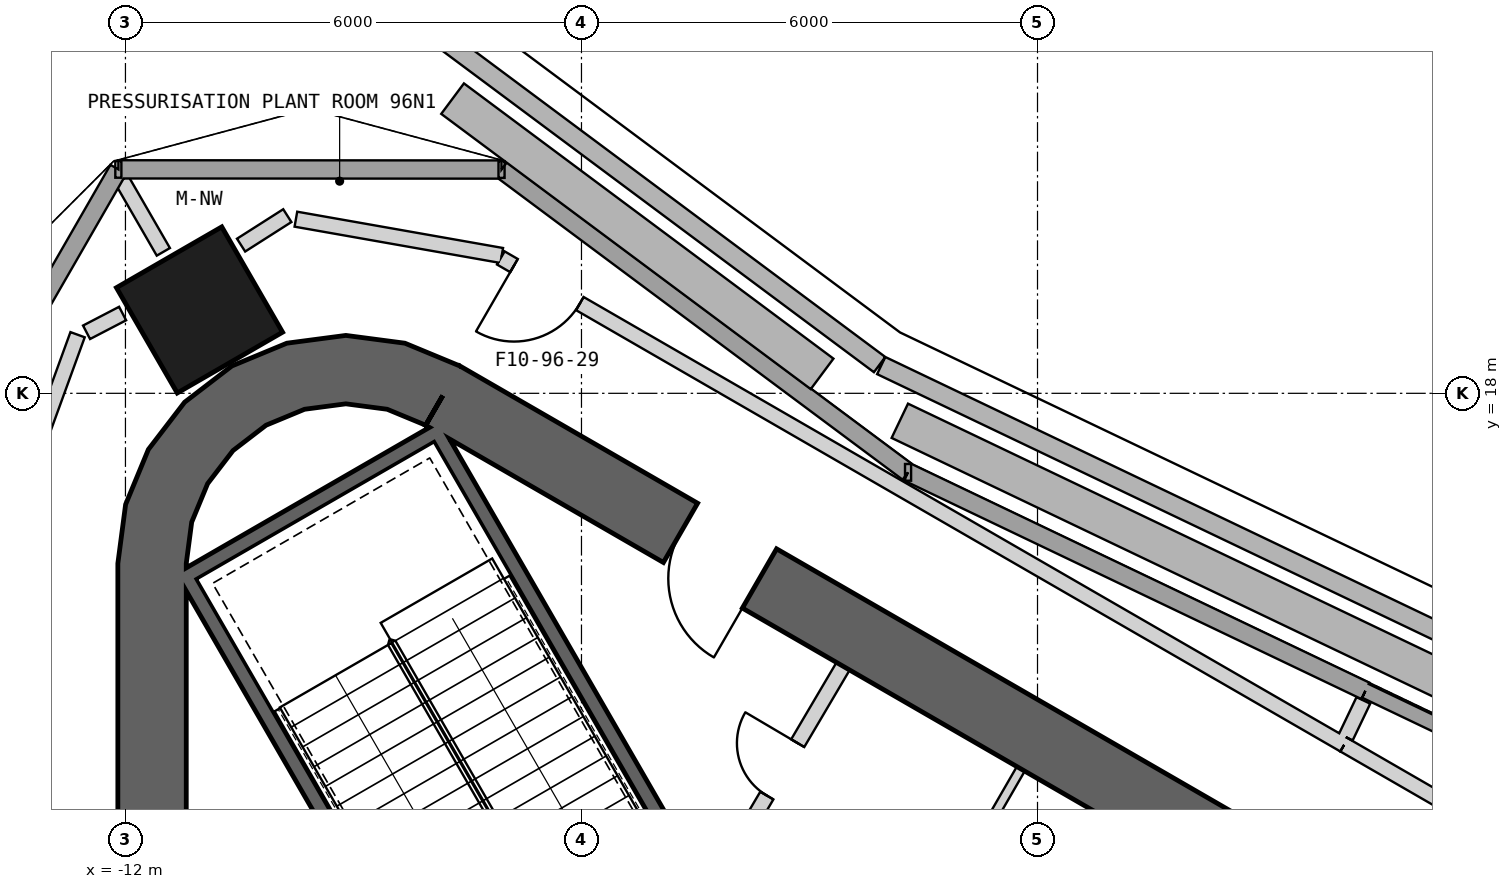
"""IFC4 building model, lengths in metres.
Left out: names, types, materials, properties, quantities, classifications, styles, units other than length and angle.
Written with IfcOpenShell. Run it as: python <this file> out.ifc"""

import sys

from ifc_helpers import new_model, si_unit, direction, frame, frame_2d, origin, origin_2d, place, context, subcontext, project, spatial, polyline, rectangle, outline, extrude, element, fill, save


model = new_model("IFC4")
c1 = context("Model", 3, precision=1e-05, world=origin(), true_north=direction((0.0, 1.0)))
c2 = subcontext(c1, "Body", "Model", "MODEL_VIEW")
j1 = project(units=[si_unit("LENGTHUNIT", "METRE"), si_unit("PLANEANGLEUNIT", "RADIAN")], contexts=[c1])
p1 = place(None, origin())
s1 = spatial("IfcSite", under=j1, at=p1, CompositionType="ELEMENT")
p2 = place(p1, origin())
s2 = spatial("IfcBuilding", under=s1, at=p2, CompositionType="ELEMENT")
p3 = place(p2, frame((0.0, 0.0, 425.3)))
s3 = spatial("IfcBuildingStorey", under=s2, at=p3, CompositionType="ELEMENT", Elevation=425.3)
p4 = place(p3, frame((-11.025, 19.097, -0.25), z_axis=(0.0, 0.0, 1.0), x_axis=(-0.5, 0.866025403784, 0.0)))
e1 = element("IfcColumn", 1, at=p4, inside=s3, PredefinedType="COLUMN", context=c2, shape_type="SweptSolid", body=[
    extrude(rectangle(XDim=1.6, YDim=1.6, at=origin_2d()), origin(), (0.0, 0.0, 1.0), 5.25),
])
p5 = place(p3, frame((19.475, 2.208, 0.0), z_axis=(0.0, 0.0, 1.0), x_axis=(-0.866028369851, 0.499994862586, 0.0)))
e2 = element("IfcWall", 2, at=p5, inside=s3, PredefinedType="SHEAR", context=c2, shape_type="SweptSolid", body=[
    extrude(rectangle(XDim=31.523, YDim=0.9, at=frame_2d((15.762, 0.0))), origin(), (0.0, 0.0, 1.0), 5.0),
])
p6 = place(p5, frame((3.612, 0.0, 0.0)))
e3 = element("IfcOpeningElement", 3, at=p6, cuts=e2, PredefinedType="OPENING", context=c2, shape_type="SweptSolid", body=[
    extrude(rectangle(XDim=1.2, YDim=2.4, at=frame_2d((0.6, 1.2))), frame((0.0, 0.46, 0.0), z_axis=(0.0, -1.0, 0.0), x_axis=(1.0, 0.0, 0.0)), (0.0, 0.0, 1.0), 0.92),
])
p7 = place(p5, frame((26.712, 0.0, 0.0)))
e4 = element("IfcOpeningElement", 4, at=p7, cuts=e2, PredefinedType="OPENING", context=c2, shape_type="SweptSolid", body=[
    extrude(rectangle(XDim=1.2, YDim=2.4, at=frame_2d((0.6, 1.2))), frame((0.0, 0.46, 0.0), z_axis=(0.0, -1.0, 0.0), x_axis=(1.0, 0.0, 0.0)), (0.0, 0.0, 1.0), 0.92),
])
p8 = place(p3, frame((-11.65, 15.762, 0.0), z_axis=(0.0, 0.0, 1.0), x_axis=(0.0, -1.0, 0.0)))
e5 = element("IfcWall", 5, at=p8, inside=s3, PredefinedType="SHEAR", context=c2, shape_type="SweptSolid", body=[
    extrude(rectangle(XDim=31.523, YDim=0.9, at=frame_2d((15.762, 0.0))), origin(), (0.0, 0.0, 1.0), 5.0),
])
p9 = place(p8, frame((3.612, 0.0, 0.0)))
e6 = element("IfcOpeningElement", 6, at=p9, cuts=e5, PredefinedType="OPENING", context=c2, shape_type="SweptSolid", body=[
    extrude(rectangle(XDim=1.2, YDim=2.4, at=frame_2d((0.6, 1.2))), frame((0.0, 0.46, 0.0), z_axis=(0.0, -1.0, 0.0), x_axis=(1.0, 0.0, 0.0)), (0.0, 0.0, 1.0), 0.92),
])
p10 = place(p8, frame((26.712, 0.0, 0.0)))
e7 = element("IfcOpeningElement", 7, at=p10, cuts=e5, PredefinedType="OPENING", context=c2, shape_type="SweptSolid", body=[
    extrude(rectangle(XDim=1.2, YDim=2.4, at=frame_2d((0.6, 1.2))), frame((0.0, 0.46, 0.0), z_axis=(0.0, -1.0, 0.0), x_axis=(1.0, 0.0, 0.0)), (0.0, 0.0, 1.0), 0.92),
])
p11 = place(p3, origin())
e8 = element("IfcWall", 8, at=p11, inside=s3, PredefinedType="SHEAR", context=c2, shape_type="SweptSolid", body=[
    extrude(outline(polyline([(-7.6, 18.36), (-8.323, 18.659), (-9.1, 18.762), (-9.876, 18.659), (-10.6, 18.36), (-11.221, 17.883), (-11.698, 17.262), (-11.998, 16.538), (-12.1, 15.762), (-11.2, 15.762), (-11.128, 16.305), (-10.919, 16.812), (-10.585, 17.247), (-10.15, 17.58), (-9.644, 17.79), (-9.1, 17.862), (-8.556, 17.79), (-8.05, 17.58), (-7.6, 18.36)])), origin(), (0.0, 0.0, 1.0), 5.0),
])
p12 = place(p3, frame((4.314, 14.085, 0.0), z_axis=(0.0, 0.0, 1.0), x_axis=(-0.902315049727, 0.431077198464, 0.0)))
e9 = element("IfcWall", 9, at=p12, inside=s3, PredefinedType="SOLIDWALL", context=c2, shape_type="SweptSolid", body=[
    extrude(rectangle(XDim=6.669, YDim=0.24, at=frame_2d((3.334, 0.0))), origin(), (0.0, 0.0, 1.0), 4.75),
])
p13 = place(p3, frame((-1.703, 16.96, 0.0), z_axis=(0.0, 0.0, 1.0), x_axis=(-0.801994232546, 0.597331776288, 0.0)))
e10 = element("IfcWall", 10, at=p13, inside=s3, PredefinedType="SOLIDWALL", context=c2, shape_type="SweptSolid", body=[
    extrude(rectangle(XDim=6.669, YDim=0.24, at=frame_2d((3.335, 0.0))), origin(), (0.0, 0.0, 1.0), 4.75),
])
p14 = place(p3, frame((-7.052, 20.944, 0.0), z_axis=(0.0, 0.0, 1.0), x_axis=(-0.999999905024, 0.00043583531, 0.0)))
e11 = element("IfcWall", 11, at=p14, inside=s3, PredefinedType="SOLIDWALL", context=c2, shape_type="SweptSolid", body=[
    extrude(rectangle(XDim=5.042, YDim=0.24, at=frame_2d((2.521, 0.0))), origin(), (0.0, 0.0, 1.0), 4.75),
])
p15 = place(p3, frame((-12.094, 20.946, 0.0), z_axis=(0.0, 0.0, 1.0), x_axis=(-0.498950155725, -0.866630683799, 0.0)))
e12 = element("IfcWall", 12, at=p15, inside=s3, PredefinedType="SOLIDWALL", context=c2, shape_type="SweptSolid", body=[
    extrude(rectangle(XDim=5.055, YDim=0.24, at=frame_2d((2.527, 0.0))), origin(), (0.0, 0.0, 1.0), 4.75),
])
p16 = place(p3, frame((10.295, 11.228, 0.0), z_axis=(0.0, 0.0, 1.0), x_axis=(-0.902319256172, 0.431068393577, 0.0)))
e13 = element("IfcWall", 13, at=p16, inside=s3, PredefinedType="SOLIDWALL", context=c2, shape_type="SweptSolid", body=[
    extrude(rectangle(XDim=6.629, YDim=0.2, at=frame_2d((3.314, 0.0))), origin(), (0.0, 0.0, 1.0), 4.75),
])
p17 = place(p16, frame((2.414, 0.0, 0.0)))
e14 = element("IfcOpeningElement", 14, at=p17, cuts=e13, PredefinedType="OPENING", context=c2, shape_type="SweptSolid", body=[
    extrude(rectangle(XDim=1.8, YDim=2.4, at=frame_2d((0.9, 1.2))), frame((0.0, 0.11, 0.0), z_axis=(0.0, -1.0, 0.0), x_axis=(1.0, 0.0, 0.0)), (0.0, 0.0, 1.0), 0.22),
])
p18 = place(p3, frame((-7.914, 22.725, 0.04), z_axis=(0.0, 0.0, 1.0), x_axis=(0.801984295915, -0.597345117253, 0.0)))
e15 = element("IfcWall", 15, at=p18, inside=s3, PredefinedType="PARAPET", context=c2, shape_type="SweptSolid", body=[
    extrude(rectangle(XDim=7.278, YDim=0.25, at=frame_2d((3.639, 0.0))), origin(), (0.0, 0.0, 1.0), 1.2),
])
p19 = place(p3, frame((-2.057, 18.365, 0.04), z_axis=(0.0, 0.0, 1.0), x_axis=(0.90231764466, -0.431071766804, 0.0)))
e16 = element("IfcWall", 16, at=p19, inside=s3, PredefinedType="PARAPET", context=c2, shape_type="SweptSolid", body=[
    extrude(rectangle(XDim=21.975, YDim=0.25, at=frame_2d((10.987, 0.0))), origin(), (0.0, 0.0, 1.0), 1.2),
])
p20 = place(p3, frame((-7.696, 21.877, 0.04), z_axis=(0.0, 0.0, 1.0), x_axis=(0.801981944101, -0.597348274741, 0.0)))
e17 = element("IfcWall", 17, at=p20, inside=s3, PredefinedType="PARAPET", context=c2, shape_type="SweptSolid", body=[
    extrude(rectangle(XDim=6.062, YDim=0.5, at=frame_2d((3.031, 0.0))), origin(), (0.0, 0.0, 1.0), 0.6),
])
p21 = place(p3, frame((-1.812, 17.639, 0.04), z_axis=(0.0, 0.0, 1.0), x_axis=(0.902316498724, -0.431074165463, 0.0)))
e18 = element("IfcWall", 18, at=p21, inside=s3, PredefinedType="PARAPET", context=c2, shape_type="SweptSolid", body=[
    extrude(rectangle(XDim=20.799, YDim=0.5, at=frame_2d((10.399, 0.0))), origin(), (0.0, 0.0, 1.0), 0.6),
])
p22 = place(p3, frame((-11.245, 15.678, -0.25), z_axis=(0.0, 0.0, 1.0), x_axis=(0.499977274689, -0.866038523851, 0.0)))
e19 = element("IfcWall", 19, at=p22, inside=s3, PredefinedType="SHEAR", context=c2, shape_type="SweptSolid", body=[
    extrude(rectangle(XDim=8.1, YDim=0.2, at=frame_2d((4.05, 0.0))), origin(), (0.0, 0.0, 1.0), 5.0),
])
p23 = place(p3, frame((-7.818, 17.541, -0.25), z_axis=(0.0, 0.0, 1.0), x_axis=(-0.866044365799, -0.499967155389, 0.0)))
e20 = element("IfcWall", 20, at=p23, inside=s3, PredefinedType="SHEAR", context=c2, shape_type="SweptSolid", body=[
    extrude(rectangle(XDim=3.8, YDim=0.2, at=frame_2d((1.9, 0.0))), origin(), (0.0, 0.0, 1.0), 5.0),
])
p24 = place(p3, frame((-7.854, 17.405, -0.25), z_axis=(0.0, 0.0, 1.0), x_axis=(0.499997992926, -0.866026562566, 0.0)))
e21 = element("IfcWall", 21, at=p24, inside=s3, PredefinedType="SHEAR", context=c2, shape_type="SweptSolid", body=[
    extrude(rectangle(XDim=7.9, YDim=0.2, at=frame_2d((3.95, 0.0))), origin(), (0.0, 0.0, 1.0), 5.0),
])
p25 = place(p3, frame((-0.22, 13.06, 0.0), z_axis=(0.0, 0.0, 1.0), x_axis=(-0.499984717929, -0.866034226713, 0.0)))
e22 = element("IfcWall", 22, at=p25, inside=s3, PredefinedType="PARTITIONING", context=c2, shape_type="SweptSolid", body=[
    extrude(rectangle(XDim=3.25, YDim=0.12, at=frame_2d((1.625, 0.0))), origin(), (0.0, 0.0, 1.0), 4.75),
])
p26 = place(p25, frame((1.225, 0.0, 0.0)))
e23 = element("IfcOpeningElement", 23, at=p26, cuts=e22, PredefinedType="OPENING", context=c2, shape_type="SweptSolid", body=[
    extrude(rectangle(XDim=0.8, YDim=2.1, at=frame_2d((0.4, 1.05))), frame((0.0, 0.07, 0.0), z_axis=(0.0, -1.0, 0.0), x_axis=(1.0, 0.0, 0.0)), (0.0, 0.0, 1.0), 0.14),
])
p27 = place(p3, frame((-2.558, 14.409, 0.0), z_axis=(0.0, 0.0, 1.0), x_axis=(-0.508018930956, -0.861345903683, 0.0)))
e24 = element("IfcWall", 24, at=p27, inside=s3, PredefinedType="PARTITIONING", context=c2, shape_type="SweptSolid", body=[
    extrude(rectangle(XDim=3.15, YDim=0.2, at=frame_2d((1.575, 0.0))), origin(), (0.0, 0.0, 1.0), 4.75),
])
p28 = place(p27, frame((1.175, 0.0, 0.0)))
e25 = element("IfcOpeningElement", 25, at=p28, cuts=e24, PredefinedType="OPENING", context=c2, shape_type="SweptSolid", body=[
    extrude(rectangle(XDim=0.8, YDim=2.1, at=frame_2d((0.4, 1.05))), frame((0.0, 0.11, 0.0), z_axis=(0.0, -1.0, 0.0), x_axis=(1.0, 0.0, 0.0)), (0.0, 0.0, 1.0), 0.22),
])
p29 = place(p3, frame((-12.63, 18.771, 0.0), z_axis=(0.0, 0.0, 1.0), x_axis=(-0.342015224264, -0.939694411163, 0.0)))
e26 = element("IfcWall", 26, at=p29, inside=s3, PredefinedType="PARTITIONING", context=c2, shape_type="SweptSolid", body=[
    extrude(rectangle(XDim=2.737, YDim=0.2, at=frame_2d((1.368, 0.0))), origin(), (0.0, 0.0, 1.0), 4.75),
])
p30 = place(p3, frame((-12.038, 19.05, 0.0), z_axis=(0.0, 0.0, 1.0), x_axis=(-0.887186880255, -0.461410272429, 0.0)))
e27 = element("IfcWall", 27, at=p30, inside=s3, PredefinedType="PARTITIONING", context=c2, shape_type="SweptSolid", body=[
    extrude(rectangle(XDim=0.534, YDim=0.2, at=frame_2d((0.267, 0.0))), origin(), (0.0, 0.0, 1.0), 4.75),
])
p31 = place(p3, frame((-11.501, 19.861, 0.0), z_axis=(0.0, 0.0, 1.0), x_axis=(-0.500107244371, 0.865963477364, 0.0)))
e28 = element("IfcWall", 28, at=p31, inside=s3, PredefinedType="PARTITIONING", context=c2, shape_type="SweptSolid", body=[
    extrude(rectangle(XDim=1.098, YDim=0.2, at=frame_2d((0.549, 0.0))), origin(), (0.0, 0.0, 1.0), 3.93),
])
p32 = place(p3, frame((9.792, 10.05, 0.0), z_axis=(0.0, 0.0, 1.0), x_axis=(-0.866022320763, 0.500005339912, 0.0)))
e29 = element("IfcWall", 29, at=p32, inside=s3, PredefinedType="PARTITIONING", context=c2, shape_type="SweptSolid", body=[
    extrude(rectangle(XDim=6.649, YDim=0.2, at=frame_2d((3.324, 0.0))), origin(), (0.0, 0.0, 1.0), 4.75),
])
p33 = place(p32, frame((2.856, 0.0, 0.0)))
e30 = element("IfcOpeningElement", 30, at=p33, cuts=e29, PredefinedType="OPENING", context=c2, shape_type="SweptSolid", body=[
    extrude(rectangle(XDim=1.0, YDim=2.1, at=frame_2d((0.5, 1.05))), frame((0.0, 0.11, 0.0), z_axis=(0.0, -1.0, 0.0), x_axis=(1.0, 0.0, 0.0)), (0.0, 0.0, 1.0), 0.22),
])
p34 = place(p3, frame((4.034, 13.375, 0.0), z_axis=(0.0, 0.0, 1.0), x_axis=(-0.866024064453, 0.500002319783, 0.0)))
e31 = element("IfcWall", 31, at=p34, inside=s3, PredefinedType="PARTITIONING", context=c2, shape_type="SweptSolid", body=[
    extrude(rectangle(XDim=12.812, YDim=0.2, at=frame_2d((6.406, 0.0))), origin(), (0.0, 0.0, 1.0), 4.75),
])
p35 = place(p34, frame((11.612, 0.0, 0.0)))
e32 = element("IfcOpeningElement", 32, at=p35, cuts=e31, PredefinedType="OPENING", context=c2, shape_type="SweptSolid", body=[
    extrude(rectangle(XDim=1.0, YDim=2.1, at=frame_2d((0.5, 1.05))), frame((0.0, 0.11, 0.0), z_axis=(0.0, -1.0, 0.0), x_axis=(1.0, 0.0, 0.0)), (0.0, 0.0, 1.0), 0.22),
])
p36 = place(p3, frame((-9.87, 20.337, 0.0), z_axis=(0.0, 0.0, 1.0), x_axis=(-0.843326891705, -0.537400924569, 0.0)))
e33 = element("IfcWall", 33, at=p36, inside=s3, PredefinedType="PARTITIONING", context=c2, shape_type="SweptSolid", body=[
    extrude(rectangle(XDim=0.721, YDim=0.2, at=frame_2d((0.361, 0.0))), origin(), (0.0, 0.0, 1.0), 4.75),
])
p37 = place(p3, frame((-7.049, 19.813, 0.0), z_axis=(0.0, 0.0, 1.0), x_axis=(-0.984805002764, 0.173663774378, 0.0)))
e34 = element("IfcWall", 34, at=p37, inside=s3, PredefinedType="PARTITIONING", context=c2, shape_type="SweptSolid", body=[
    extrude(rectangle(XDim=2.75, YDim=0.2, at=frame_2d((1.375, 0.0))), origin(), (0.0, 0.0, 1.0), 4.75),
])
p38 = place(p3, frame((4.057, 13.477, 0.0), z_axis=(0.0, 0.0, 1.0), x_axis=(0.431439342404, 0.902141947714, 0.0)))
e35 = element("IfcWall", 35, at=p38, inside=s3, PredefinedType="PARTITIONING", context=c2, shape_type="SweptSolid", body=[
    extrude(rectangle(XDim=0.535, YDim=0.2, at=frame_2d((0.267, 0.0))), origin(), (0.0, 0.0, 1.0), 4.75),
])
p39 = place(p28, origin())
e36 = element("IfcDoor", 36, at=p39, inside=s3, OperationType="SINGLE_SWING_LEFT", PredefinedType="USERDEFINED", context=c2, shape_type="SweptSolid", body=[
    extrude(rectangle(XDim=0.8, YDim=2.1, at=frame_2d((0.4, 1.05))), frame((0.0, 0.025, 0.0), z_axis=(0.0, -1.0, 0.0), x_axis=(1.0, 0.0, 0.0)), (0.0, 0.0, 1.0), 0.05),
])
fill(e25, e36)
p40 = place(p35, origin())
e37 = element("IfcDoor", 37, at=p40, inside=s3, OperationType="SINGLE_SWING_RIGHT", PredefinedType="USERDEFINED", context=c2, shape_type="SweptSolid", body=[
    extrude(rectangle(XDim=1.0, YDim=2.1, at=frame_2d((0.5, 1.05))), frame((0.0, 0.025, 0.0), z_axis=(0.0, -1.0, 0.0), x_axis=(1.0, 0.0, 0.0)), (0.0, 0.0, 1.0), 0.05),
])
fill(e32, e37)
p41 = place(p7, origin())
e38 = element("IfcDoor", 38, at=p41, inside=s3, OperationType="SINGLE_SWING_LEFT", PredefinedType="USERDEFINED", context=c2, shape_type="SweptSolid", body=[
    extrude(rectangle(XDim=1.2, YDim=2.4, at=frame_2d((0.6, 1.2))), frame((0.0, 0.025, 0.0), z_axis=(0.0, -1.0, 0.0), x_axis=(1.0, 0.0, 0.0)), (0.0, 0.0, 1.0), 0.05),
])
fill(e4, e38)
save(model, sys.argv[1])
